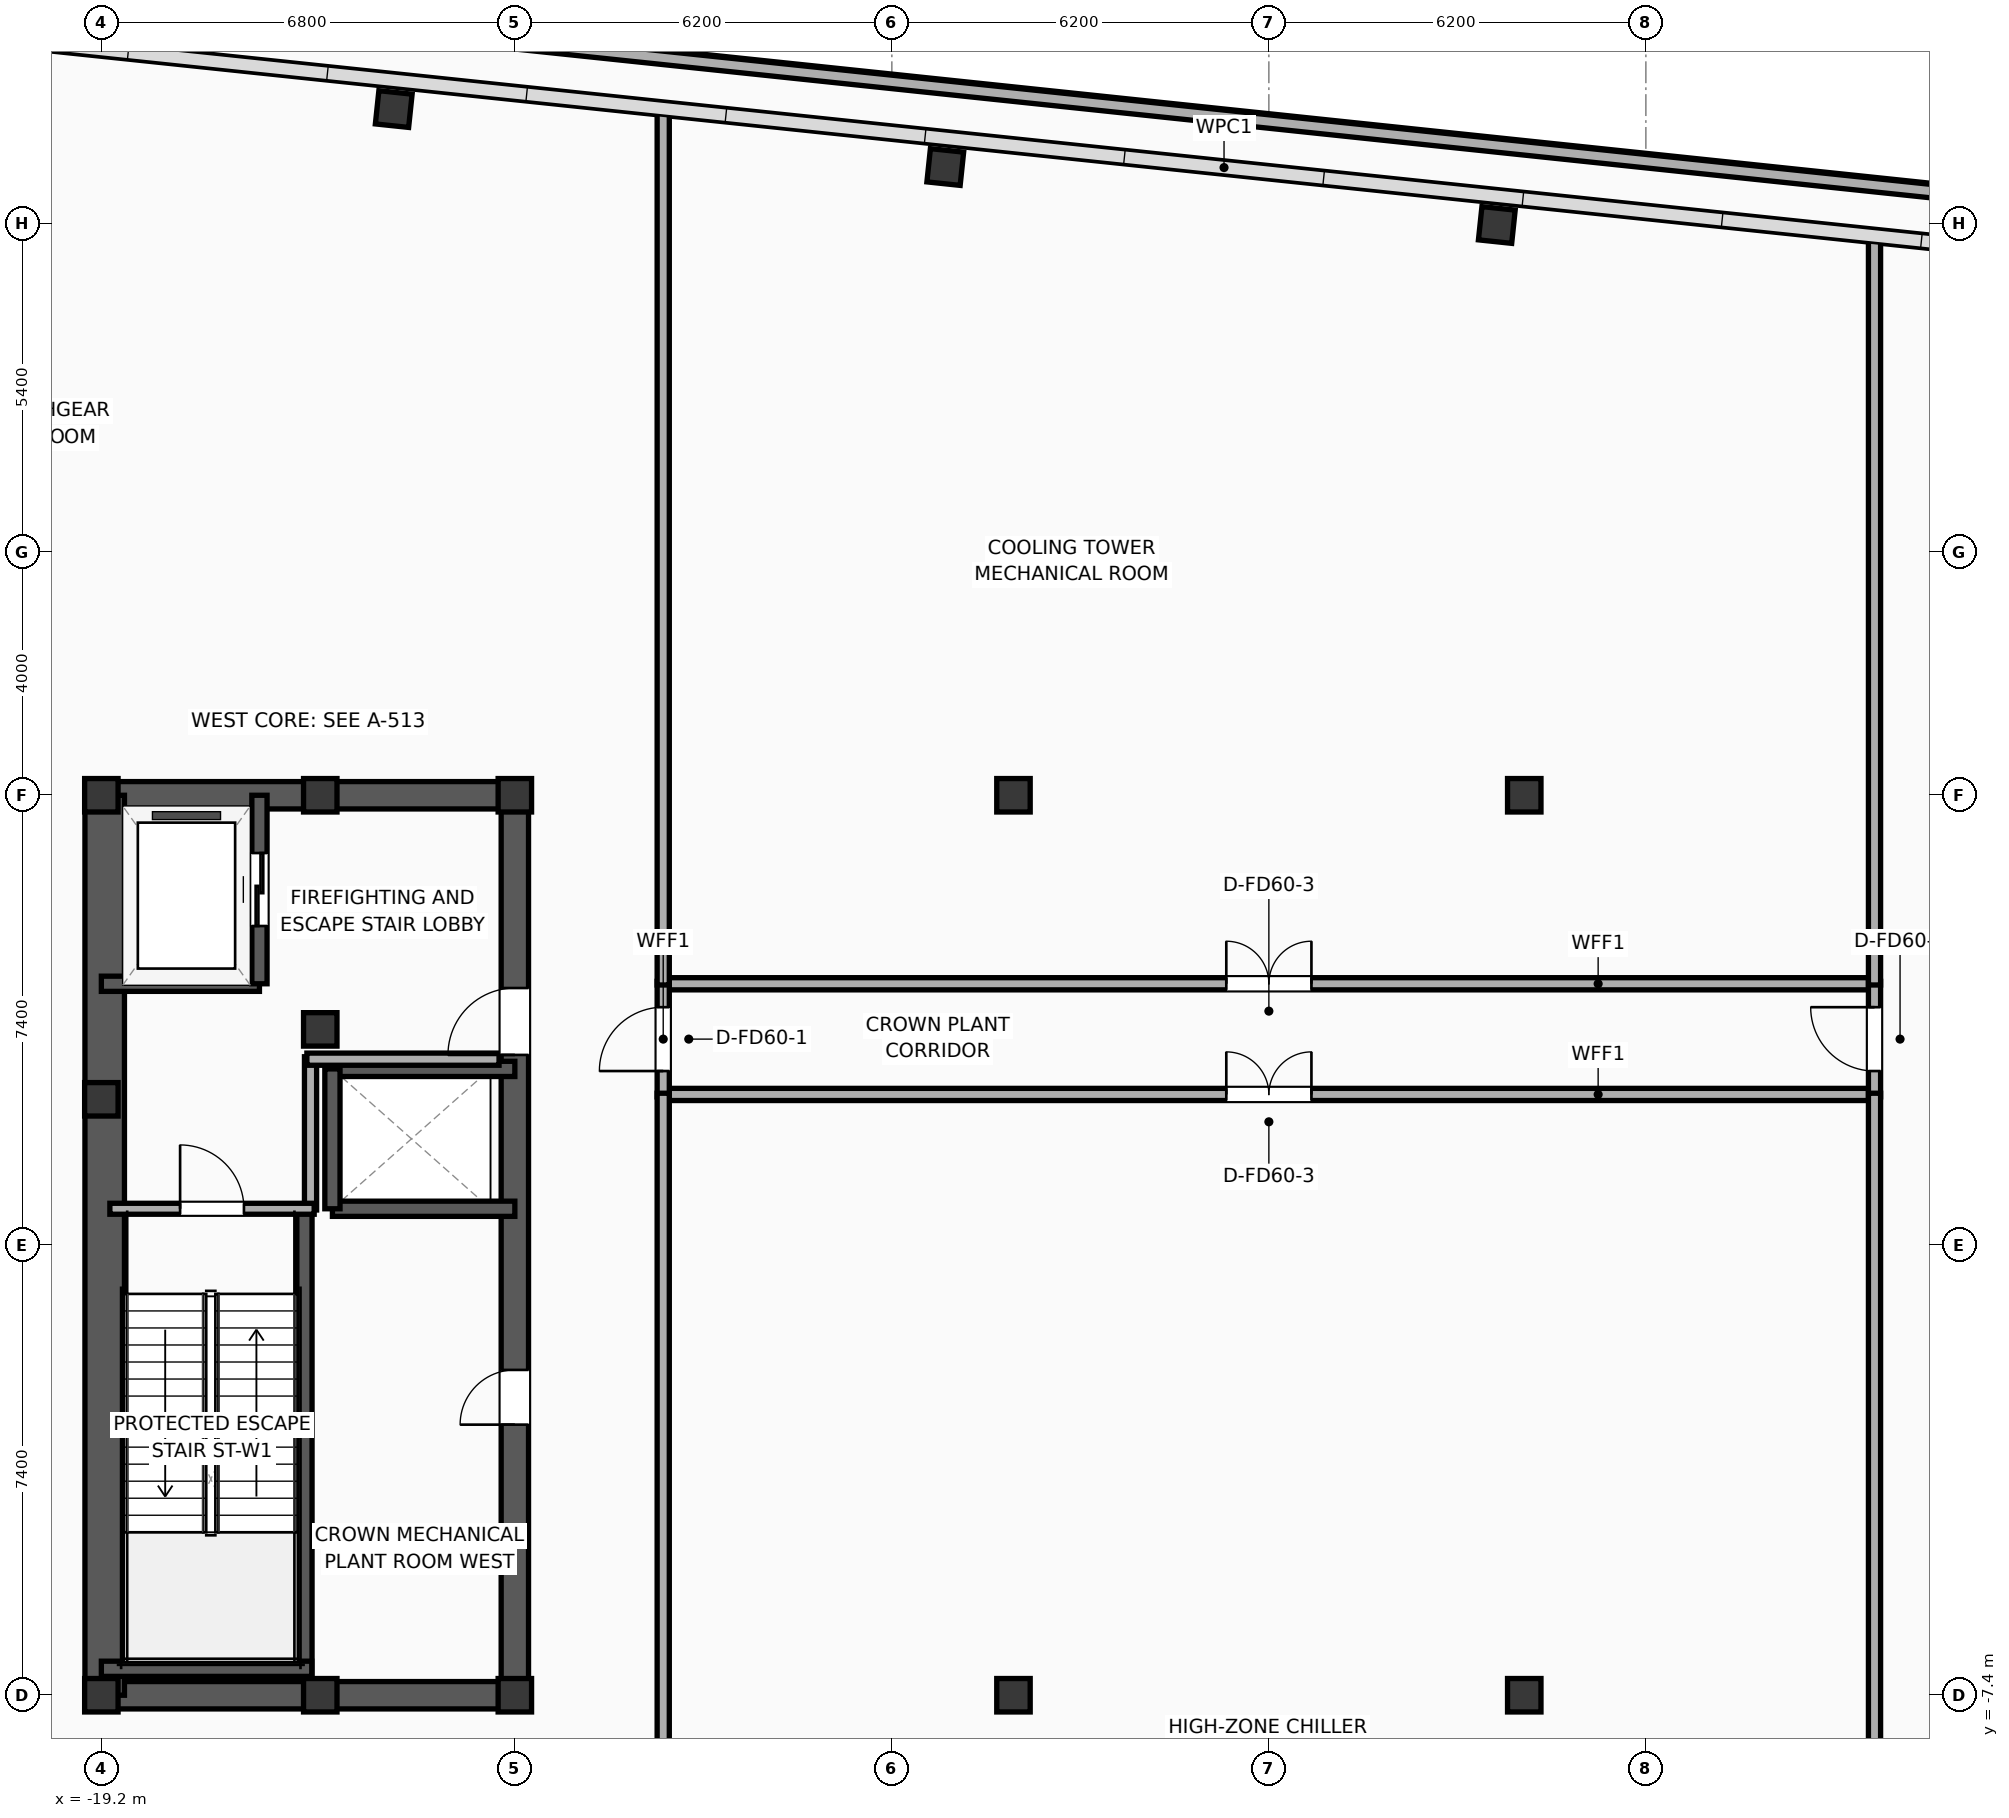
"""IFC4 building model, lengths in metres.
Left out: names, types, materials, properties, quantities, classifications, styles, units other than length and angle.
Written with IfcOpenShell. Run it as: python <this file> out.ifc"""

import sys

from ifc_helpers import new_model, si_unit, direction, frame, frame_2d, origin, origin_2d, place, context, subcontext, project, spatial, rectangle, hollow_rectangle, extrude, element, fill, save


model = new_model("IFC4")
c1 = context("Model", 3, precision=1e-05, world=origin(), true_north=direction((0.0, 1.0)))
c2 = subcontext(c1, "Body", "Model", "MODEL_VIEW")
j1 = project(units=[si_unit("LENGTHUNIT", "METRE"), si_unit("PLANEANGLEUNIT", "RADIAN")], contexts=[c1])
p1 = place(None, origin())
s1 = spatial("IfcSite", under=j1, at=p1, CompositionType="ELEMENT")
p2 = place(p1, origin())
s2 = spatial("IfcBuilding", under=s1, at=p2, CompositionType="ELEMENT")
p3 = place(p2, frame((0.0, 0.0, 310.7)))
s3 = spatial("IfcBuildingStorey", under=s2, at=p3, CompositionType="ELEMENT", Elevation=310.7)
for number, where, z_axis, x_axis in (
    (1, (-19.2, -7.4, 0.0), (0.0, 0.0, 1.0), (1.0, 0.0, 0.0)),
    (2, (-19.2, 2.4, 0.0), (0.0, 0.0, 1.0), (1.0, 0.0, 0.0)),
    (3, (-19.2, 7.4, 0.0), (0.0, 0.0, 1.0), (1.0, 0.0, 0.0)),
    (4, (-15.6, -7.4, 0.0), (0.0, 0.0, 1.0), (1.0, 0.0, 0.0)),
    (5, (-15.6, 7.4, 0.0), (0.0, 0.0, 1.0), (1.0, 0.0, 0.0)),
    (6, (-12.4, -7.4, 0.0), (0.0, 0.0, 1.0), (1.0, 0.0, 0.0)),
    (7, (-15.6, 3.55, 0.0), (0.0, 0.0, 1.0), (1.0, 0.0, 0.0)),
    (8, (-12.4, 7.4, 0.0), (0.0, 0.0, 1.0), (1.0, 0.0, 0.0)),
):
    element("IfcColumn", number, at=place(p3, frame(where, z_axis=z_axis, x_axis=x_axis)), inside=s3, PredefinedType="COLUMN", context=c2, shape_type="SweptSolid", body=[
        extrude(hollow_rectangle(XDim=0.55, YDim=0.55, WallThickness=0.022, at=origin_2d()), origin(), (0.0, 0.0, 1.0), 5.3),
    ])
for number, where, z_axis, x_axis in (
    (9, (-19.425, -7.4, 0.0), (0.0, 0.0, 1.0), (1.0, 0.0, 0.0)),
    (10, (-19.425, 7.4, 0.0), (0.0, 0.0, 1.0), (1.0, 0.0, 0.0)),
):
    element("IfcWall", number, at=place(p3, frame(where, z_axis=z_axis, x_axis=x_axis)), inside=s3, PredefinedType="SHEAR", context=c2, shape_type="SweptSolid", body=[
        extrude(rectangle(XDim=7.25, YDim=0.45, at=frame_2d((3.625, 0.0))), origin(), (0.0, 0.0, 1.0), 5.025),
    ])
p4 = place(p3, frame((-19.145, -7.4, 0.0), z_axis=(0.0, 0.0, 1.0), x_axis=(0.0, 1.0, 0.0)))
e11 = element("IfcWall", 11, at=p4, inside=s3, PredefinedType="SHEAR", context=c2, shape_type="SweptSolid", body=[
    extrude(rectangle(XDim=14.8, YDim=0.65, at=frame_2d((7.4, 0.0))), origin(), (0.0, 0.0, 1.0), 5.025),
])
p5 = place(p3, frame((-12.4, -7.4, 0.0), z_axis=(0.0, 0.0, 1.0), x_axis=(0.0, 1.0, 0.0)))
e12 = element("IfcWall", 12, at=p5, inside=s3, PredefinedType="SHEAR", context=c2, shape_type="SweptSolid", body=[
    extrude(rectangle(XDim=14.8, YDim=0.45, at=frame_2d((7.4, 0.0))), origin(), (0.0, 0.0, 1.0), 5.025),
])
p6 = place(p5, frame((10.53, 0.0, 0.0)))
e13 = element("IfcOpeningElement", 13, at=p6, cuts=e12, PredefinedType="OPENING", context=c2, shape_type="SweptSolid", body=[
    extrude(rectangle(XDim=1.1, YDim=2.05, at=frame_2d((0.55, 1.025))), frame((0.0, 0.235, 0.0), z_axis=(0.0, -1.0, 0.0), x_axis=(1.0, 0.0, 0.0)), (0.0, 0.0, 1.0), 0.47),
])
p7 = place(p5, frame((4.45, 0.0, 0.0)))
e14 = element("IfcOpeningElement", 14, at=p7, cuts=e12, PredefinedType="OPENING", context=c2, shape_type="SweptSolid", body=[
    extrude(rectangle(XDim=0.9, YDim=2.05, at=frame_2d((0.45, 1.025))), frame((0.0, 0.235, 0.0), z_axis=(0.0, -1.0, 0.0), x_axis=(1.0, 0.0, 0.0)), (0.0, 0.0, 1.0), 0.47),
])
p8 = place(p3, frame((-15.86, -7.085, 0.0), z_axis=(0.0, 0.0, 1.0), x_axis=(0.0, 1.0, 0.0)))
e15 = element("IfcWall", 15, at=p8, inside=s3, PredefinedType="SOLIDWALL", context=c2, shape_type="SweptSolid", body=[
    extrude(rectangle(XDim=7.685, YDim=0.25, at=frame_2d((3.843, 0.0))), origin(), (0.0, 0.0, 1.0), 5.025),
])
p9 = place(p3, frame((-19.2, -6.965, 0.0), z_axis=(0.0, 0.0, 1.0), x_axis=(1.0, 0.0, 0.0)))
e16 = element("IfcWall", 16, at=p9, inside=s3, PredefinedType="SOLIDWALL", context=c2, shape_type="SweptSolid", body=[
    extrude(rectangle(XDim=3.46, YDim=0.25, at=frame_2d((1.73, 0.0))), origin(), (0.0, 0.0, 1.0), 5.025),
])
for number, where, z_axis, x_axis in (
    (17, (-4.2, -7.4, 0.0), (0.0, 0.0, 1.0), (1.0, 0.0, 0.0)),
    (18, (-4.2, 7.4, 0.0), (0.0, 0.0, 1.0), (1.0, 0.0, 0.0)),
    (19, (4.2, -7.4, 0.0), (0.0, 0.0, 1.0), (1.0, 0.0, 0.0)),
    (20, (4.2, 7.4, 0.0), (0.0, 0.0, 1.0), (1.0, 0.0, 0.0)),
):
    element("IfcColumn", number, at=place(p3, frame(where, z_axis=z_axis, x_axis=x_axis)), inside=s3, PredefinedType="COLUMN", context=c2, shape_type="SweptSolid", body=[
        extrude(hollow_rectangle(XDim=0.55, YDim=0.55, WallThickness=0.022, at=origin_2d()), origin(), (0.0, 0.0, 1.0), 5.3),
    ])
for number, where, z_axis, x_axis in (
    (21, (3.749, 16.778, -0.4), (0.0, 0.0, 1.0), (0.995, -0.105, 0.0)),
    (22, (-5.322, 17.732, -0.4), (0.0, 0.0, 1.0), (0.995, -0.105, 0.0)),
    (23, (-14.392, 18.685, -0.4), (0.0, 0.0, 1.0), (0.995, -0.105, 0.0)),
):
    element("IfcColumn", number, at=place(p3, frame(where, z_axis=z_axis, x_axis=x_axis)), inside=s3, PredefinedType="COLUMN", context=c2, shape_type="SweptSolid", body=[
        extrude(hollow_rectangle(XDim=0.55, YDim=0.55, WallThickness=0.022, at=origin_2d()), origin(), (0.0, 0.0, 1.0), 5.7),
    ])
p10 = place(p3, frame((-23.395, 20.104, 0.0), z_axis=(0.0, 0.0, 1.0), x_axis=(0.994522116558, -0.104526358762, 0.0)))
e24 = element("IfcWall", 24, at=p10, inside=s3, PredefinedType="PARAPET", context=c2, shape_type="SweptSolid", body=[
    extrude(rectangle(XDim=45.564, YDim=0.22, at=frame_2d((22.782, 0.0))), origin(), (0.0, 0.0, 1.0), 1.2),
])
p11 = place(p3, frame((-23.908, 20.992, 0.0), z_axis=(0.0, 0.0, 1.0), x_axis=(0.994522315485, -0.10452446605, 0.0)))
e25 = element("IfcWall", 25, at=p11, inside=s3, PredefinedType="PARAPET", context=c2, shape_type="SweptSolid", body=[
    extrude(rectangle(XDim=46.771, YDim=0.22, at=frame_2d((23.385, 0.0))), origin(), (0.0, 0.0, 1.0), 1.2),
])
p12 = place(p3, frame((-19.2, 4.3, 0.0), z_axis=(0.0, 0.0, 1.0), x_axis=(1.0, 0.0, 0.0)))
e26 = element("IfcWall", 26, at=p12, inside=s3, PredefinedType="SOLIDWALL", context=c2, shape_type="SweptSolid", body=[
    extrude(rectangle(XDim=2.6, YDim=0.25, at=frame_2d((1.3, 0.0))), origin(), (0.0, 0.0, 1.0), 5.025),
])
p13 = place(p3, frame((-16.6, 4.3, 0.0), z_axis=(0.0, 0.0, 1.0), x_axis=(0.0, 1.0, 0.0)))
e27 = element("IfcWall", 27, at=p13, inside=s3, PredefinedType="SOLIDWALL", context=c2, shape_type="SweptSolid", body=[
    extrude(rectangle(XDim=3.1, YDim=0.25, at=frame_2d((1.55, 0.0))), origin(), (0.0, 0.0, 1.0), 5.025),
])
p14 = place(p13, frame((0.95, 0.0, 0.0)))
e28 = element("IfcOpeningElement", 28, at=p14, cuts=e27, PredefinedType="OPENING", context=c2, shape_type="SweptSolid", body=[
    extrude(rectangle(XDim=1.2, YDim=2.05, at=frame_2d((0.6, 1.025))), frame((0.0, 0.135, 0.0), z_axis=(0.0, -1.0, 0.0), x_axis=(1.0, 0.0, 0.0)), (0.0, 0.0, 1.0), 0.27),
])
for number, where, z_axis, x_axis in (
    (29, (-15.4, 0.6, 0.0), (0.0, 0.0, 1.0), (1.0, 0.0, 0.0)),
    (30, (-12.4, 2.9, 0.0), (0.0, 0.0, 1.0), (-1.0, 0.0, 0.0)),
):
    element("IfcWall", number, at=place(p3, frame(where, z_axis=z_axis, x_axis=x_axis)), inside=s3, PredefinedType="SOLIDWALL", context=c2, shape_type="SweptSolid", body=[
        extrude(rectangle(XDim=3.0, YDim=0.25, at=frame_2d((1.5, 0.0))), origin(), (0.0, 0.0, 1.0), 5.025),
    ])
p15 = place(p3, frame((-15.4, 2.9, 0.0), z_axis=(0.0, 0.0, 1.0), x_axis=(0.0, -1.0, 0.0)))
e31 = element("IfcWall", 31, at=p15, inside=s3, PredefinedType="SOLIDWALL", context=c2, shape_type="SweptSolid", body=[
    extrude(rectangle(XDim=2.3, YDim=0.25, at=frame_2d((1.15, 0.0))), origin(), (0.0, 0.0, 1.0), 5.025),
])
p16 = place(p3, frame((-15.76, 0.58, 0.0), z_axis=(0.0, 0.0, 1.0), x_axis=(0.0, 1.0, 0.0)))
e32 = element("IfcWall", 32, at=p16, inside=s3, PredefinedType="PARTITIONING", context=c2, shape_type="SweptSolid", body=[
    extrude(rectangle(XDim=2.52, YDim=0.2, at=frame_2d((1.26, 0.0))), origin(), (0.0, 0.0, 1.0), 5.025),
])
p17 = place(p3, frame((-15.82, 3.06, 0.0), z_axis=(0.0, 0.0, 1.0), x_axis=(1.0, 0.0, 0.0)))
e33 = element("IfcWall", 33, at=p17, inside=s3, PredefinedType="PARTITIONING", context=c2, shape_type="SweptSolid", body=[
    extrude(rectangle(XDim=3.16, YDim=0.2, at=frame_2d((1.58, 0.0))), origin(), (0.0, 0.0, 1.0), 5.025),
])
p18 = place(p3, frame((-19.06, 0.6, 0.0), z_axis=(0.0, 0.0, 1.0), x_axis=(1.0, 0.0, 0.0)))
e34 = element("IfcWall", 34, at=p18, inside=s3, PredefinedType="PARTITIONING", context=c2, shape_type="SweptSolid", body=[
    extrude(rectangle(XDim=3.36, YDim=0.18, at=frame_2d((1.68, 0.0))), origin(), (0.0, 0.0, 1.0), 5.025),
])
p19 = place(p18, frame((1.155, 0.0, 0.0)))
e35 = element("IfcOpeningElement", 35, at=p19, cuts=e34, PredefinedType="OPENING", context=c2, shape_type="SweptSolid", body=[
    extrude(rectangle(XDim=1.05, YDim=2.05, at=frame_2d((0.525, 1.025))), frame((0.0, 0.1, 0.0), z_axis=(0.0, -1.0, 0.0), x_axis=(1.0, 0.0, 0.0)), (0.0, 0.0, 1.0), 0.2),
])
p20 = place(p3, frame((-9.98, 2.48, 0.0), z_axis=(0.0, 0.0, 1.0), x_axis=(1.0, 0.0, 0.0)))
e36 = element("IfcWall", 36, at=p20, inside=s3, PredefinedType="PARTITIONING", context=c2, shape_type="SweptSolid", body=[
    extrude(rectangle(XDim=19.96, YDim=0.2, at=frame_2d((9.98, 0.0))), origin(), (0.0, 0.0, 1.0), 4.595),
])
p21 = place(p20, frame((9.28, 0.0, 0.0)))
e37 = element("IfcOpeningElement", 37, at=p21, cuts=e36, PredefinedType="OPENING", context=c2, shape_type="SweptSolid", body=[
    extrude(rectangle(XDim=1.4, YDim=2.05, at=frame_2d((0.7, 1.025))), frame((0.0, 0.11, 0.0), z_axis=(0.0, -1.0, 0.0), x_axis=(1.0, 0.0, 0.0)), (0.0, 0.0, 1.0), 0.22),
])
p22 = place(p3, frame((-9.98, 4.3, 0.0), z_axis=(0.0, 0.0, 1.0), x_axis=(1.0, 0.0, 0.0)))
e38 = element("IfcWall", 38, at=p22, inside=s3, PredefinedType="PARTITIONING", context=c2, shape_type="SweptSolid", body=[
    extrude(rectangle(XDim=19.96, YDim=0.2, at=frame_2d((9.98, 0.0))), origin(), (0.0, 0.0, 1.0), 5.025),
])
p23 = place(p22, frame((9.28, 0.0, 0.0)))
e39 = element("IfcOpeningElement", 39, at=p23, cuts=e38, PredefinedType="OPENING", context=c2, shape_type="SweptSolid", body=[
    extrude(rectangle(XDim=1.4, YDim=2.05, at=frame_2d((0.7, 1.025))), frame((0.0, 0.11, 0.0), z_axis=(0.0, -1.0, 0.0), x_axis=(1.0, 0.0, 0.0)), (0.0, 0.0, 1.0), 0.22),
])
p24 = place(p3, frame((-9.96, 2.44, 0.0), z_axis=(0.0, 0.0, 1.0), x_axis=(0.0, 1.0, 0.0)))
e40 = element("IfcWall", 40, at=p24, inside=s3, PredefinedType="PARTITIONING", context=c2, shape_type="SweptSolid", body=[
    extrude(rectangle(XDim=1.9, YDim=0.2, at=frame_2d((0.95, 0.0))), origin(), (0.0, 0.0, 1.0), 5.025),
])
p25 = place(p24, frame((0.425, 0.0, 0.0)))
e41 = element("IfcOpeningElement", 41, at=p25, cuts=e40, PredefinedType="OPENING", context=c2, shape_type="SweptSolid", body=[
    extrude(rectangle(XDim=1.05, YDim=2.05, at=frame_2d((0.525, 1.025))), frame((0.0, 0.11, 0.0), z_axis=(0.0, -1.0, 0.0), x_axis=(1.0, 0.0, 0.0)), (0.0, 0.0, 1.0), 0.22),
])
p26 = place(p3, frame((9.96, 2.44, 0.0), z_axis=(0.0, 0.0, 1.0), x_axis=(0.0, 1.0, 0.0)))
e42 = element("IfcWall", 42, at=p26, inside=s3, PredefinedType="PARTITIONING", context=c2, shape_type="SweptSolid", body=[
    extrude(rectangle(XDim=1.9, YDim=0.2, at=frame_2d((0.95, 0.0))), origin(), (0.0, 0.0, 1.0), 5.025),
])
p27 = place(p26, frame((0.425, 0.0, 0.0)))
e43 = element("IfcOpeningElement", 43, at=p27, cuts=e42, PredefinedType="OPENING", context=c2, shape_type="SweptSolid", body=[
    extrude(rectangle(XDim=1.05, YDim=2.05, at=frame_2d((0.525, 1.025))), frame((0.0, 0.11, 0.0), z_axis=(0.0, -1.0, 0.0), x_axis=(1.0, 0.0, 0.0)), (0.0, 0.0, 1.0), 0.22),
])
p28 = place(p3, frame((-9.96, -17.125, 0.0), z_axis=(0.0, 0.0, 1.0), x_axis=(0.0, 1.0, 0.0)))
e44 = element("IfcWall", 44, at=p28, inside=s3, PredefinedType="PARTITIONING", context=c2, shape_type="SweptSolid", body=[
    extrude(rectangle(XDim=19.625, YDim=0.2, at=frame_2d((9.812, 0.0))), origin(), (0.0, 0.0, 1.0), 3.915),
])
p29 = place(p3, frame((-9.96, 4.28, 0.0), z_axis=(0.0, 0.0, 1.0), x_axis=(0.0, 1.0, 0.0)))
e45 = element("IfcWall", 45, at=p29, inside=s3, PredefinedType="PARTITIONING", context=c2, shape_type="SweptSolid", body=[
    extrude(rectangle(XDim=14.392, YDim=0.2, at=frame_2d((7.196, 0.0))), origin(), (0.0, 0.0, 1.0), 5.025),
])
p30 = place(p3, frame((9.96, -19.218, 0.0), z_axis=(0.0, 0.0, 1.0), x_axis=(0.0, 1.0, 0.0)))
e46 = element("IfcWall", 46, at=p30, inside=s3, PredefinedType="PARTITIONING", context=c2, shape_type="SweptSolid", body=[
    extrude(rectangle(XDim=21.718, YDim=0.2, at=frame_2d((10.859, 0.0))), origin(), (0.0, 0.0, 1.0), 3.915),
])
p31 = place(p3, frame((9.96, 4.28, 0.0), z_axis=(0.0, 0.0, 1.0), x_axis=(0.0, 1.0, 0.0)))
e47 = element("IfcWall", 47, at=p31, inside=s3, PredefinedType="PARTITIONING", context=c2, shape_type="SweptSolid", body=[
    extrude(rectangle(XDim=12.298, YDim=0.2, at=frame_2d((6.149, 0.0))), origin(), (0.0, 0.0, 1.0), 5.025),
])
p32 = place(p14, origin())
e48 = element("IfcDoor", 48, at=p32, inside=s3, OperationType="SLIDING_TO_LEFT", PredefinedType="DOOR", context=c2, shape_type="SweptSolid", body=[
    extrude(rectangle(XDim=1.2, YDim=2.05, at=frame_2d((0.6, 1.025))), frame((0.0, 0.025, 0.0), z_axis=(0.0, -1.0, 0.0), x_axis=(1.0, 0.0, 0.0)), (0.0, 0.0, 1.0), 0.05),
])
fill(e28, e48)
p33 = place(p19, origin())
e49 = element("IfcDoor", 49, at=p33, inside=s3, OperationType="SINGLE_SWING_LEFT", PredefinedType="DOOR", context=c2, shape_type="SweptSolid", body=[
    extrude(rectangle(XDim=1.05, YDim=2.05, at=frame_2d((0.525, 1.025))), frame((0.0, 0.025, 0.0), z_axis=(0.0, -1.0, 0.0), x_axis=(1.0, 0.0, 0.0)), (0.0, 0.0, 1.0), 0.05),
])
fill(e35, e49)
p34 = place(p21, origin())
e50 = element("IfcDoor", 50, at=p34, inside=s3, OperationType="DOUBLE_DOOR_SINGLE_SWING", PredefinedType="DOOR", context=c2, shape_type="SweptSolid", body=[
    extrude(rectangle(XDim=1.4, YDim=2.05, at=frame_2d((0.7, 1.025))), frame((0.0, 0.025, 0.0), z_axis=(0.0, -1.0, 0.0), x_axis=(1.0, 0.0, 0.0)), (0.0, 0.0, 1.0), 0.05),
])
fill(e37, e50)
p35 = place(p23, origin())
e51 = element("IfcDoor", 51, at=p35, inside=s3, OperationType="DOUBLE_DOOR_SINGLE_SWING", PredefinedType="DOOR", context=c2, shape_type="SweptSolid", body=[
    extrude(rectangle(XDim=1.4, YDim=2.05, at=frame_2d((0.7, 1.025))), frame((0.0, 0.025, 0.0), z_axis=(0.0, -1.0, 0.0), x_axis=(1.0, 0.0, 0.0)), (0.0, 0.0, 1.0), 0.05),
])
fill(e39, e51)
p36 = place(p25, origin())
e52 = element("IfcDoor", 52, at=p36, inside=s3, OperationType="SINGLE_SWING_LEFT", PredefinedType="DOOR", context=c2, shape_type="SweptSolid", body=[
    extrude(rectangle(XDim=1.05, YDim=2.05, at=frame_2d((0.525, 1.025))), frame((0.0, 0.025, 0.0), z_axis=(0.0, -1.0, 0.0), x_axis=(1.0, 0.0, 0.0)), (0.0, 0.0, 1.0), 0.05),
])
fill(e41, e52)
p37 = place(p27, origin())
e53 = element("IfcDoor", 53, at=p37, inside=s3, OperationType="SINGLE_SWING_RIGHT", PredefinedType="DOOR", context=c2, shape_type="SweptSolid", body=[
    extrude(rectangle(XDim=1.05, YDim=2.05, at=frame_2d((0.525, 1.025))), frame((0.0, 0.025, 0.0), z_axis=(0.0, -1.0, 0.0), x_axis=(1.0, 0.0, 0.0)), (0.0, 0.0, 1.0), 0.05),
])
fill(e43, e53)
p38 = place(p6, origin())
e54 = element("IfcDoor", 54, at=p38, inside=s3, OperationType="SINGLE_SWING_LEFT", PredefinedType="DOOR", context=c2, shape_type="SweptSolid", body=[
    extrude(rectangle(XDim=1.1, YDim=2.05, at=frame_2d((0.55, 1.025))), frame((0.0, 0.025, 0.0), z_axis=(0.0, -1.0, 0.0), x_axis=(1.0, 0.0, 0.0)), (0.0, 0.0, 1.0), 0.05),
])
fill(e13, e54)
p39 = place(p7, origin())
e55 = element("IfcDoor", 55, at=p39, inside=s3, OperationType="SINGLE_SWING_LEFT", PredefinedType="DOOR", context=c2, shape_type="SweptSolid", body=[
    extrude(rectangle(XDim=0.9, YDim=2.05, at=frame_2d((0.45, 1.025))), frame((0.0, 0.025, 0.0), z_axis=(0.0, -1.0, 0.0), x_axis=(1.0, 0.0, 0.0)), (0.0, 0.0, 1.0), 0.05),
])
fill(e14, e55)
save(model, sys.argv[1])
